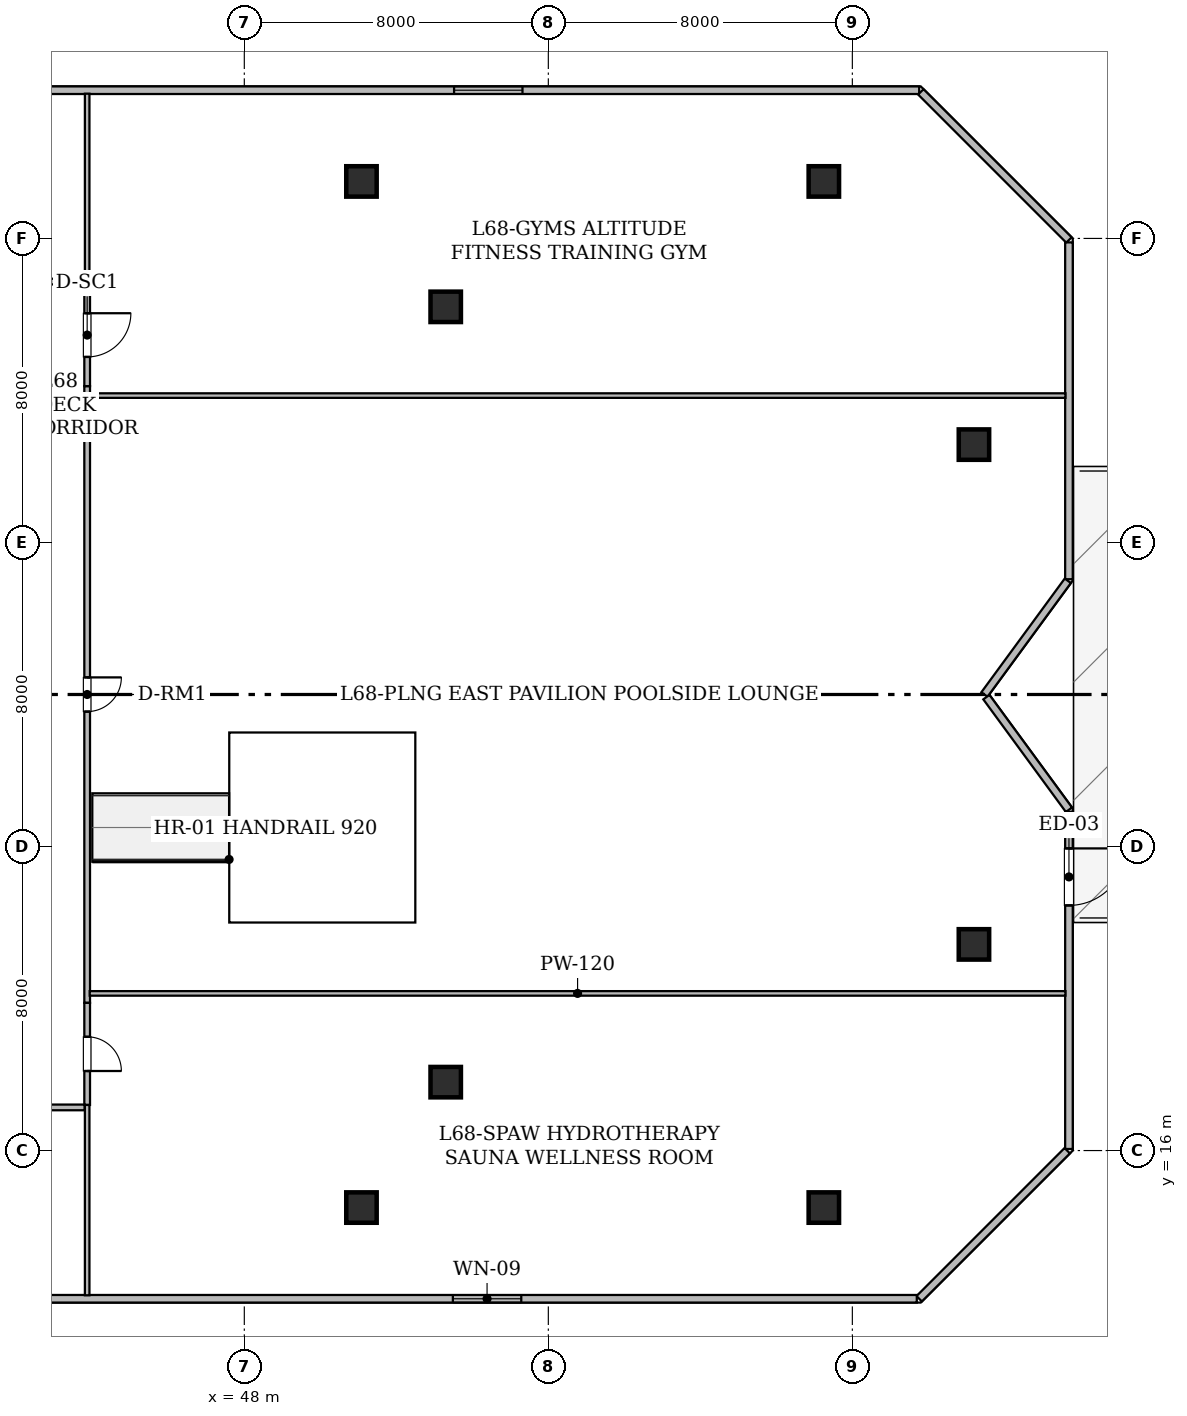
"""IFC4 building model, lengths in metres.
Left out: names, types, materials, properties, quantities, classifications, styles, units other than length and angle.
Written with IfcOpenShell. Run it as: python <this file> out.ifc"""

import sys

from ifc_helpers import new_model, si_unit, direction, frame, frame_2d, origin, origin_2d, place, context, subcontext, project, spatial, rectangle, hollow_rectangle, extrude, element, fill, save


model = new_model("IFC4")
c1 = context("Model", 3, precision=1e-05, world=origin(), true_north=direction((0.0, 1.0)))
c2 = subcontext(c1, "Body", "Model", "MODEL_VIEW")
j1 = project(units=[si_unit("LENGTHUNIT", "METRE"), si_unit("PLANEANGLEUNIT", "RADIAN")], contexts=[c1])
p1 = place(None, origin())
s1 = spatial("IfcSite", under=j1, at=p1, CompositionType="ELEMENT")
p2 = place(p1, origin())
s2 = spatial("IfcBuilding", under=s1, at=p2, CompositionType="ELEMENT")
p3 = place(p2, frame((0.0, 0.0, 264.65)))
s3 = spatial("IfcBuildingStorey", under=s2, at=p3, CompositionType="ELEMENT", Elevation=264.65)
for number, where, z_axis, x_axis in (
    (1, (51.083, 14.5, 0.0), (0.0, 0.0, 1.0), (1.0, 0.0, 0.0)),
    (2, (63.25, 14.5, 0.0), (0.0, 0.0, 1.0), (1.0, 0.0, 0.0)),
    (3, (51.083, 41.5, 0.0), (0.0, 0.0, 1.0), (1.0, 0.0, 0.0)),
    (4, (63.25, 41.5, 0.0), (0.0, 0.0, 1.0), (1.0, 0.0, 0.0)),
    (5, (67.2, 21.425, 0.0), (0.0, 0.0, 1.0), (1.0, 0.0, 0.0)),
    (6, (67.2, 34.575, 0.0), (0.0, 0.0, 1.0), (1.0, 0.0, 0.0)),
    (7, (53.3, 17.8, 0.0), (0.0, 0.0, 1.0), (1.0, 0.0, 0.0)),
    (8, (53.3, 38.2, 0.0), (0.0, 0.0, 1.0), (1.0, 0.0, 0.0)),
):
    element("IfcColumn", number, at=place(p3, frame(where, z_axis=z_axis, x_axis=x_axis)), inside=s3, PredefinedType="COLUMN", context=c2, shape_type="SweptSolid", body=[
        extrude(hollow_rectangle(XDim=0.8, YDim=0.8, WallThickness=0.04, at=origin_2d()), origin(), (0.0, 0.0, 1.0), 4.775),
    ])
p4 = place(p3, frame((24.302, 43.9, 0.0), z_axis=(0.0, 0.0, 1.0), x_axis=(1.0, 0.0, 0.0)))
e9 = element("IfcWall", 9, at=p4, inside=s3, PredefinedType="STANDARD", context=c2, shape_type="SweptSolid", body=[
    extrude(rectangle(XDim=41.457, YDim=0.2, at=frame_2d((20.729, 0.0))), origin(), (0.0, 0.0, 1.0), 4.38),
])
p5 = place(p4, frame((29.218, 0.0, 0.85)))
e10 = element("IfcOpeningElement", 10, at=p5, cuts=e9, PredefinedType="OPENING", context=c2, shape_type="SweptSolid", body=[
    extrude(rectangle(XDim=1.8, YDim=0.92, at=frame_2d((0.9, 0.46))), frame((0.0, 0.11, 0.0), z_axis=(0.0, -1.0, 0.0), x_axis=(1.0, 0.0, 0.0)), (0.0, 0.0, 1.0), 0.22),
])
p6 = place(p3, frame((65.802, 43.857, 0.0), z_axis=(0.0, 0.0, 1.0), x_axis=(0.707106781187, -0.707106781187, 0.0)))
e11 = element("IfcWall", 11, at=p6, inside=s3, PredefinedType="STANDARD", context=c2, shape_type="SweptSolid", body=[
    extrude(rectangle(XDim=5.512, YDim=0.2, at=frame_2d((2.756, 0.0))), origin(), (0.0, 0.0, 1.0), 4.38),
])
p7 = place(p3, frame((69.7, 39.896, 0.0), z_axis=(0.0, 0.0, 1.0), x_axis=(0.0, -1.0, 0.0)))
e12 = element("IfcWall", 12, at=p7, inside=s3, PredefinedType="STANDARD", context=c2, shape_type="SweptSolid", body=[
    extrude(rectangle(XDim=8.863, YDim=0.2, at=frame_2d((4.432, 0.0))), origin(), (0.0, 0.0, 1.0), 4.38),
])
p8 = place(p3, frame((69.67, 30.992, 0.0), z_axis=(0.0, 0.0, 1.0), x_axis=(-0.591320870733, -0.806436375566, 0.0)))
e13 = element("IfcWall", 13, at=p8, inside=s3, PredefinedType="STANDARD", context=c2, shape_type="SweptSolid", body=[
    extrude(rectangle(XDim=3.71, YDim=0.2, at=frame_2d((1.855, 0.0))), origin(), (0.0, 0.0, 1.0), 4.38),
])
p9 = place(p3, frame((67.527, 27.931, 0.0), z_axis=(0.0, 0.0, 1.0), x_axis=(0.591248456881, -0.80648946815, 0.0)))
e14 = element("IfcWall", 14, at=p9, inside=s3, PredefinedType="STANDARD", context=c2, shape_type="SweptSolid", body=[
    extrude(rectangle(XDim=3.675, YDim=0.2, at=frame_2d((1.837, 0.0))), origin(), (0.0, 0.0, 1.0), 4.38),
])
p10 = place(p3, frame((69.7, 24.916, 0.0), z_axis=(0.0, 0.0, 1.0), x_axis=(0.0, -1.0, 0.0)))
e15 = element("IfcWall", 15, at=p10, inside=s3, PredefinedType="STANDARD", context=c2, shape_type="SweptSolid", body=[
    extrude(rectangle(XDim=8.875, YDim=0.2, at=frame_2d((4.438, 0.0))), origin(), (0.0, 0.0, 1.0), 4.38),
])
p11 = place(p10, frame((0.966, 0.0, 0.0)))
e16 = element("IfcOpeningElement", 16, at=p11, cuts=e15, PredefinedType="OPENING", context=c2, shape_type="SweptSolid", body=[
    extrude(rectangle(XDim=1.5, YDim=2.2, at=frame_2d((0.75, 1.1))), frame((0.0, 0.11, 0.0), z_axis=(0.0, -1.0, 0.0), x_axis=(1.0, 0.0, 0.0)), (0.0, 0.0, 1.0), 0.22),
])
p12 = place(p3, frame((69.655, 15.996, 0.0), z_axis=(0.0, 0.0, 1.0), x_axis=(-0.707106781187, -0.707106781187, 0.0)))
e17 = element("IfcWall", 17, at=p12, inside=s3, PredefinedType="STANDARD", context=c2, shape_type="SweptSolid", body=[
    extrude(rectangle(XDim=5.51, YDim=0.2, at=frame_2d((2.755, 0.0))), origin(), (0.0, 0.0, 1.0), 4.38),
])
p13 = place(p3, frame((65.696, 12.1, 0.0), z_axis=(0.0, 0.0, 1.0), x_axis=(-1.0, 0.0, 0.0)))
e18 = element("IfcWall", 18, at=p13, inside=s3, PredefinedType="STANDARD", context=c2, shape_type="SweptSolid", body=[
    extrude(rectangle(XDim=41.393, YDim=0.2, at=frame_2d((20.697, 0.0))), origin(), (0.0, 0.0, 1.0), 4.38),
])
p14 = place(p13, frame((10.408, 0.0, 0.85)))
e19 = element("IfcOpeningElement", 19, at=p14, cuts=e18, PredefinedType="OPENING", context=c2, shape_type="SweptSolid", body=[
    extrude(rectangle(XDim=1.8, YDim=0.92, at=frame_2d((0.9, 0.46))), frame((0.0, 0.11, 0.0), z_axis=(0.0, -1.0, 0.0), x_axis=(1.0, 0.0, 0.0)), (0.0, 0.0, 1.0), 0.22),
])
p15 = place(p3, frame((43.865, 36.114, 0.0), z_axis=(0.0, 0.0, 1.0), x_axis=(0.0, -1.0, 0.0)))
e20 = element("IfcWall", 20, at=p15, inside=s3, PredefinedType="STANDARD", context=c2, shape_type="SweptSolid", body=[
    extrude(rectangle(XDim=16.228, YDim=0.15, at=frame_2d((8.114, 0.0))), origin(), (0.0, 0.0, 1.0), 2.82),
])
p16 = place(p15, frame((7.664, 0.0, 0.0)))
e21 = element("IfcOpeningElement", 21, at=p16, cuts=e20, PredefinedType="OPENING", context=c2, shape_type="SweptSolid", body=[
    extrude(rectangle(XDim=0.9, YDim=2.1, at=frame_2d((0.45, 1.05))), frame((0.0, 0.085, 0.0), z_axis=(0.0, -1.0, 0.0), x_axis=(1.0, 0.0, 0.0)), (0.0, 0.0, 1.0), 0.17),
])
p17 = place(p3, frame((43.865, 19.886, 0.0), z_axis=(0.0, 0.0, 1.0), x_axis=(0.0, -1.0, 0.0)))
e22 = element("IfcWall", 22, at=p17, inside=s3, PredefinedType="STANDARD", context=c2, shape_type="SweptSolid", body=[
    extrude(rectangle(XDim=2.686, YDim=0.15, at=frame_2d((1.343, 0.0))), origin(), (0.0, 0.0, 1.0), 2.82),
])
p18 = place(p17, frame((0.893, 0.0, 0.0)))
e23 = element("IfcOpeningElement", 23, at=p18, cuts=e22, PredefinedType="OPENING", context=c2, shape_type="SweptSolid", body=[
    extrude(rectangle(XDim=0.9, YDim=2.1, at=frame_2d((0.45, 1.05))), frame((0.0, 0.085, 0.0), z_axis=(0.0, -1.0, 0.0), x_axis=(1.0, 0.0, 0.0)), (0.0, 0.0, 1.0), 0.17),
])
p19 = place(p3, frame((43.865, 38.8, 0.0), z_axis=(0.0, 0.0, 1.0), x_axis=(0.0, -1.0, 0.0)))
e24 = element("IfcWall", 24, at=p19, inside=s3, PredefinedType="STANDARD", context=c2, shape_type="SweptSolid", body=[
    extrude(rectangle(XDim=2.686, YDim=0.15, at=frame_2d((1.343, 0.0))), origin(), (0.0, 0.0, 1.0), 2.82),
])
p20 = place(p19, frame((0.768, 0.0, 0.0)))
e25 = element("IfcOpeningElement", 25, at=p20, cuts=e24, PredefinedType="OPENING", context=c2, shape_type="SweptSolid", body=[
    extrude(rectangle(XDim=1.15, YDim=2.2, at=frame_2d((0.575, 1.1))), frame((0.0, 0.085, 0.0), z_axis=(0.0, -1.0, 0.0), x_axis=(1.0, 0.0, 0.0)), (0.0, 0.0, 1.0), 0.17),
])
p21 = place(p3, frame((43.8, 17.135, 0.0), z_axis=(0.0, 0.0, 1.0), x_axis=(-1.0, 0.0, 0.0)))
e26 = element("IfcWall", 26, at=p21, inside=s3, PredefinedType="STANDARD", context=c2, shape_type="SweptSolid", body=[
    extrude(rectangle(XDim=16.75, YDim=0.15, at=frame_2d((8.375, 0.0))), origin(), (0.0, 0.0, 1.0), 2.82),
])
p22 = place(p21, frame((7.925, 0.0, 0.0)))
e27 = element("IfcOpeningElement", 27, at=p22, cuts=e26, PredefinedType="OPENING", context=c2, shape_type="SweptSolid", body=[
    extrude(rectangle(XDim=0.9, YDim=2.1, at=frame_2d((0.45, 1.05))), frame((0.0, 0.085, 0.0), z_axis=(0.0, -1.0, 0.0), x_axis=(1.0, 0.0, 0.0)), (0.0, 0.0, 1.0), 0.17),
])
p23 = place(p3, frame((27.05, 38.865, 0.0), z_axis=(0.0, 0.0, 1.0), x_axis=(1.0, 0.0, 0.0)))
e28 = element("IfcWall", 28, at=p23, inside=s3, PredefinedType="STANDARD", context=c2, shape_type="SweptSolid", body=[
    extrude(rectangle(XDim=16.75, YDim=0.15, at=frame_2d((8.375, 0.0))), origin(), (0.0, 0.0, 1.0), 2.82),
])
p24 = place(p23, frame((7.925, 0.0, 0.0)))
e29 = element("IfcOpeningElement", 29, at=p24, cuts=e28, PredefinedType="OPENING", context=c2, shape_type="SweptSolid", body=[
    extrude(rectangle(XDim=0.9, YDim=2.1, at=frame_2d((0.45, 1.05))), frame((0.0, 0.085, 0.0), z_axis=(0.0, -1.0, 0.0), x_axis=(1.0, 0.0, 0.0)), (0.0, 0.0, 1.0), 0.17),
])
for number, where, z_axis, x_axis in (
    (30, (69.608, 20.135, 0.0), (0.0, 0.0, 1.0), (-1.0, 0.0, 0.0)),
    (31, (43.932, 35.865, 0.0), (0.0, 0.0, 1.0), (1.0, 0.0, 0.0)),
):
    element("IfcWall", number, at=place(p3, frame(where, z_axis=z_axis, x_axis=x_axis)), inside=s3, PredefinedType="PARTITIONING", context=c2, shape_type="SweptSolid", body=[
        extrude(rectangle(XDim=25.676, YDim=0.12, at=frame_2d((12.838, 0.0))), origin(), (0.0, 0.0, 1.0), 2.82),
    ])
for number, where, z_axis, x_axis in (
    (32, (43.865, 12.192, 0.0), (0.0, 0.0, 1.0), (0.0, 1.0, 0.0)),
    (33, (43.865, 38.8, 0.0), (0.0, 0.0, 1.0), (0.0, 1.0, 0.0)),
):
    element("IfcWall", number, at=place(p3, frame(where, z_axis=z_axis, x_axis=x_axis)), inside=s3, PredefinedType="PARTITIONING", context=c2, shape_type="SweptSolid", body=[
        extrude(rectangle(XDim=5.008, YDim=0.12, at=frame_2d((2.504, 0.0))), origin(), (0.0, 0.0, 1.0), 2.82),
    ])
p25 = place(p11, origin())
e34 = element("IfcDoor", 34, at=p25, inside=s3, OperationType="SINGLE_SWING_LEFT", PredefinedType="DOOR", context=c2, shape_type="SweptSolid", body=[
    extrude(rectangle(XDim=1.5, YDim=2.2, at=frame_2d((0.75, 1.1))), frame((0.0, 0.025, 0.0), z_axis=(0.0, -1.0, 0.0), x_axis=(1.0, 0.0, 0.0)), (0.0, 0.0, 1.0), 0.05),
])
fill(e16, e34)
p26 = place(p14, origin())
e35 = element("IfcWindow", 35, at=p26, inside=s3, PartitioningType="SINGLE_PANEL", PredefinedType="WINDOW", context=c2, shape_type="SweptSolid", body=[
    extrude(rectangle(XDim=1.8, YDim=0.92, at=frame_2d((0.9, 0.46))), frame((0.0, 0.03, 0.0), z_axis=(0.0, -1.0, 0.0), x_axis=(1.0, 0.0, 0.0)), (0.0, 0.0, 1.0), 0.06),
])
fill(e19, e35)
p27 = place(p5, origin())
e36 = element("IfcWindow", 36, at=p27, inside=s3, PartitioningType="SINGLE_PANEL", PredefinedType="WINDOW", context=c2, shape_type="SweptSolid", body=[
    extrude(rectangle(XDim=1.8, YDim=0.92, at=frame_2d((0.9, 0.46))), frame((0.0, 0.03, 0.0), z_axis=(0.0, -1.0, 0.0), x_axis=(1.0, 0.0, 0.0)), (0.0, 0.0, 1.0), 0.06),
])
fill(e10, e36)
p28 = place(p16, origin())
e37 = element("IfcDoor", 37, at=p28, inside=s3, OperationType="SINGLE_SWING_LEFT", PredefinedType="DOOR", context=c2, shape_type="SweptSolid", body=[
    extrude(rectangle(XDim=0.9, YDim=2.1, at=frame_2d((0.45, 1.05))), frame((0.0, 0.025, 0.0), z_axis=(0.0, -1.0, 0.0), x_axis=(1.0, 0.0, 0.0)), (0.0, 0.0, 1.0), 0.05),
])
fill(e21, e37)
p29 = place(p18, origin())
e38 = element("IfcDoor", 38, at=p29, inside=s3, OperationType="SINGLE_SWING_RIGHT", PredefinedType="DOOR", context=c2, shape_type="SweptSolid", body=[
    extrude(rectangle(XDim=0.9, YDim=2.1, at=frame_2d((0.45, 1.05))), frame((0.0, 0.025, 0.0), z_axis=(0.0, -1.0, 0.0), x_axis=(1.0, 0.0, 0.0)), (0.0, 0.0, 1.0), 0.05),
])
fill(e23, e38)
p30 = place(p20, origin())
e39 = element("IfcDoor", 39, at=p30, inside=s3, OperationType="SINGLE_SWING_LEFT", PredefinedType="DOOR", context=c2, shape_type="SweptSolid", body=[
    extrude(rectangle(XDim=1.15, YDim=2.2, at=frame_2d((0.575, 1.1))), frame((0.0, 0.025, 0.0), z_axis=(0.0, -1.0, 0.0), x_axis=(1.0, 0.0, 0.0)), (0.0, 0.0, 1.0), 0.05),
])
fill(e25, e39)
save(model, sys.argv[1])
